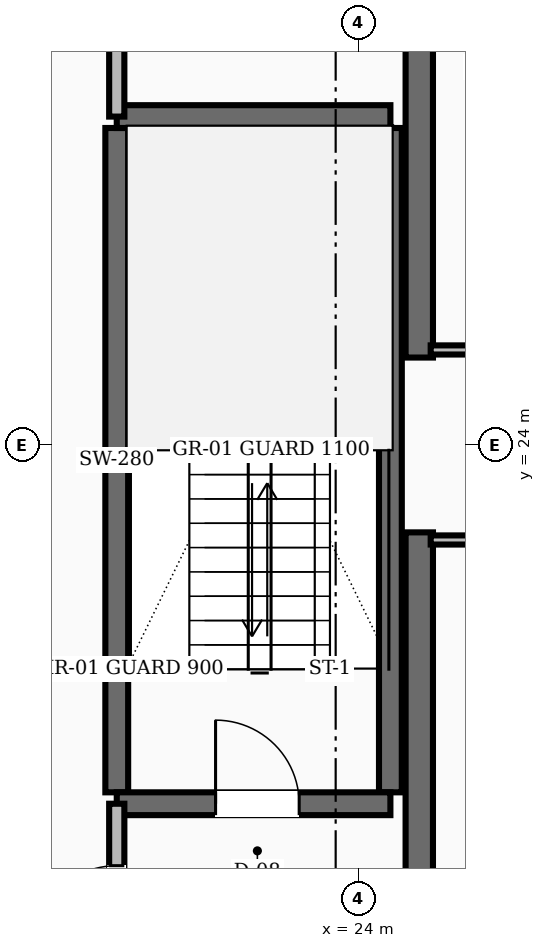
"""IFC4 building model, lengths in metres.
Left out: names, types, materials, properties, quantities, classifications, styles, units other than length and angle.
Written with IfcOpenShell. Run it as: python <this file> out.ifc"""

import sys

from ifc_helpers import new_model, si_unit, direction, frame, frame_2d, origin, place, context, subcontext, project, spatial, rectangle, extrude, element, fill, save


model = new_model("IFC4")
c1 = context("Model", 3, precision=1e-05, world=origin(), true_north=direction((0.0, 1.0)))
c2 = subcontext(c1, "Body", "Model", "MODEL_VIEW")
j1 = project(units=[si_unit("LENGTHUNIT", "METRE"), si_unit("PLANEANGLEUNIT", "RADIAN")], contexts=[c1])
p1 = place(None, origin())
s1 = spatial("IfcSite", under=j1, at=p1, CompositionType="ELEMENT")
p2 = place(p1, origin())
s2 = spatial("IfcBuilding", under=s1, at=p2, CompositionType="ELEMENT")
p3 = place(p2, frame((0.0, 0.0, 138.8)))
s3 = spatial("IfcBuildingStorey", under=s2, at=p3, CompositionType="ELEMENT", Elevation=138.8)
for number, where, z_axis, x_axis in (
    (1, (24.8, 16.55, 0.0), (0.0, 0.0, 1.0), (0.0, 1.0, 0.0)),
    (2, (24.8, 25.15, 0.0), (0.0, 0.0, 1.0), (0.0, 1.0, 0.0)),
):
    element("IfcWall", number, at=place(p3, frame(where, z_axis=z_axis, x_axis=x_axis)), inside=s3, PredefinedType="SHEAR", context=c2, shape_type="SweptSolid", body=[
        extrude(rectangle(XDim=6.3, YDim=0.36, at=frame_2d((3.15, 0.0))), origin(), (0.0, 0.0, 1.0), 3.6),
    ])
for number, where, z_axis, x_axis in (
    (3, (20.82, 19.43, 0.0), (0.0, 0.0, 1.0), (0.0, 1.0, 0.0)),
    (4, (24.42, 19.43, 0.0), (0.0, 0.0, 1.0), (0.0, 1.0, 0.0)),
):
    element("IfcWall", number, at=place(p3, frame(where, z_axis=z_axis, x_axis=x_axis)), inside=s3, PredefinedType="SHEAR", context=c2, shape_type="SweptSolid", body=[
        extrude(rectangle(XDim=8.74, YDim=0.3, at=frame_2d((4.37, 0.0))), origin(), (0.0, 0.0, 1.0), 3.6),
    ])
p4 = place(p3, frame((20.82, 19.28, 0.0), z_axis=(0.0, 0.0, 1.0), x_axis=(1.0, 0.0, 0.0)))
e5 = element("IfcWall", 5, at=p4, inside=s3, PredefinedType="SHEAR", context=c2, shape_type="SweptSolid", body=[
    extrude(rectangle(XDim=3.6, YDim=0.3, at=frame_2d((1.8, 0.0))), origin(), (0.0, 0.0, 1.0), 3.6),
])
p5 = place(p4, frame((1.3, 0.0, 0.0)))
e6 = element("IfcOpeningElement", 6, at=p5, cuts=e5, PredefinedType="OPENING", context=c2, shape_type="SweptSolid", body=[
    extrude(rectangle(XDim=1.1, YDim=2.1, at=frame_2d((0.55, 1.05))), frame((0.0, 0.16, 0.0), z_axis=(0.0, -1.0, 0.0), x_axis=(1.0, 0.0, 0.0)), (0.0, 0.0, 1.0), 0.32),
])
p6 = place(p3, frame((20.82, 28.32, 0.0), z_axis=(0.0, 0.0, 1.0), x_axis=(1.0, 0.0, 0.0)))
e7 = element("IfcWall", 7, at=p6, inside=s3, PredefinedType="SHEAR", context=c2, shape_type="SweptSolid", body=[
    extrude(rectangle(XDim=3.6, YDim=0.3, at=frame_2d((1.8, 0.0))), origin(), (0.0, 0.0, 1.0), 3.6),
])
p7 = place(p3, frame((20.82, 16.55, 0.0), z_axis=(0.0, 0.0, 1.0), x_axis=(0.0, 1.0, 0.0)))
e8 = element("IfcWall", 8, at=p7, inside=s3, PredefinedType="SOLIDWALL", context=c2, shape_type="SweptSolid", body=[
    extrude(rectangle(XDim=2.73, YDim=0.2, at=frame_2d((1.365, 0.0))), origin(), (0.0, 0.0, 1.0), 2.8),
])
p8 = place(p7, frame((0.815, 0.0, 0.0)))
e9 = element("IfcOpeningElement", 9, at=p8, cuts=e8, PredefinedType="OPENING", context=c2, shape_type="SweptSolid", body=[
    extrude(rectangle(XDim=1.1, YDim=2.1, at=frame_2d((0.55, 1.05))), frame((0.0, 0.11, 0.0), z_axis=(0.0, -1.0, 0.0), x_axis=(1.0, 0.0, 0.0)), (0.0, 0.0, 1.0), 0.22),
])
p9 = place(p3, frame((20.82, 28.32, 0.0), z_axis=(0.0, 0.0, 1.0), x_axis=(0.0, 1.0, 0.0)))
e10 = element("IfcWall", 10, at=p9, inside=s3, PredefinedType="SOLIDWALL", context=c2, shape_type="SweptSolid", body=[
    extrude(rectangle(XDim=3.13, YDim=0.2, at=frame_2d((1.565, 0.0))), origin(), (0.0, 0.0, 1.0), 2.8),
])
p10 = place(p9, frame((1.09, 0.0, 0.0)))
e11 = element("IfcOpeningElement", 11, at=p10, cuts=e10, PredefinedType="OPENING", context=c2, shape_type="SweptSolid", body=[
    extrude(rectangle(XDim=0.95, YDim=2.1, at=frame_2d((0.475, 1.05))), frame((0.0, 0.11, 0.0), z_axis=(0.0, -1.0, 0.0), x_axis=(1.0, 0.0, 0.0)), (0.0, 0.0, 1.0), 0.22),
])
p11 = place(p3, frame((24.95, 25.25, 0.0), z_axis=(0.0, 0.0, 1.0), x_axis=(1.0, 0.0, 0.0)))
e12 = element("IfcWall", 12, at=p11, inside=s3, PredefinedType="PARTITIONING", context=c2, shape_type="SweptSolid", body=[
    extrude(rectangle(XDim=3.2, YDim=0.12, at=frame_2d((1.6, 0.0))), origin(), (0.0, 0.0, 1.0), 2.8),
])
p12 = place(p11, frame((1.125, 0.0, 0.0)))
e13 = element("IfcOpeningElement", 13, at=p12, cuts=e12, PredefinedType="OPENING", context=c2, shape_type="SweptSolid", body=[
    extrude(rectangle(XDim=0.95, YDim=2.1, at=frame_2d((0.475, 1.05))), frame((0.0, 0.07, 0.0), z_axis=(0.0, -1.0, 0.0), x_axis=(1.0, 0.0, 0.0)), (0.0, 0.0, 1.0), 0.14),
])
p13 = place(p3, frame((24.95, 22.75, 0.0), z_axis=(0.0, 0.0, 1.0), x_axis=(1.0, 0.0, 0.0)))
e14 = element("IfcWall", 14, at=p13, inside=s3, PredefinedType="PARTITIONING", context=c2, shape_type="SweptSolid", body=[
    extrude(rectangle(XDim=3.2, YDim=0.12, at=frame_2d((1.6, 0.0))), origin(), (0.0, 0.0, 1.0), 2.8),
])
p14 = place(p13, frame((1.125, 0.0, 0.0)))
e15 = element("IfcOpeningElement", 15, at=p14, cuts=e14, PredefinedType="OPENING", context=c2, shape_type="SweptSolid", body=[
    extrude(rectangle(XDim=0.95, YDim=2.1, at=frame_2d((0.475, 1.05))), frame((0.0, 0.07, 0.0), z_axis=(0.0, -1.0, 0.0), x_axis=(1.0, 0.0, 0.0)), (0.0, 0.0, 1.0), 0.14),
])
p15 = place(p5, origin())
e16 = element("IfcDoor", 16, at=p15, inside=s3, OperationType="SINGLE_SWING_LEFT", PredefinedType="DOOR", context=c2, shape_type="SweptSolid", body=[
    extrude(rectangle(XDim=1.1, YDim=2.1, at=frame_2d((0.55, 1.05))), frame((0.0, 0.025, 0.0), z_axis=(0.0, -1.0, 0.0), x_axis=(1.0, 0.0, 0.0)), (0.0, 0.0, 1.0), 0.05),
])
fill(e6, e16)
p16 = place(p8, origin())
e17 = element("IfcDoor", 17, at=p16, inside=s3, OperationType="SINGLE_SWING_LEFT", PredefinedType="DOOR", context=c2, shape_type="SweptSolid", body=[
    extrude(rectangle(XDim=1.1, YDim=2.1, at=frame_2d((0.55, 1.05))), frame((0.0, 0.025, 0.0), z_axis=(0.0, -1.0, 0.0), x_axis=(1.0, 0.0, 0.0)), (0.0, 0.0, 1.0), 0.05),
])
fill(e9, e17)
save(model, sys.argv[1])
